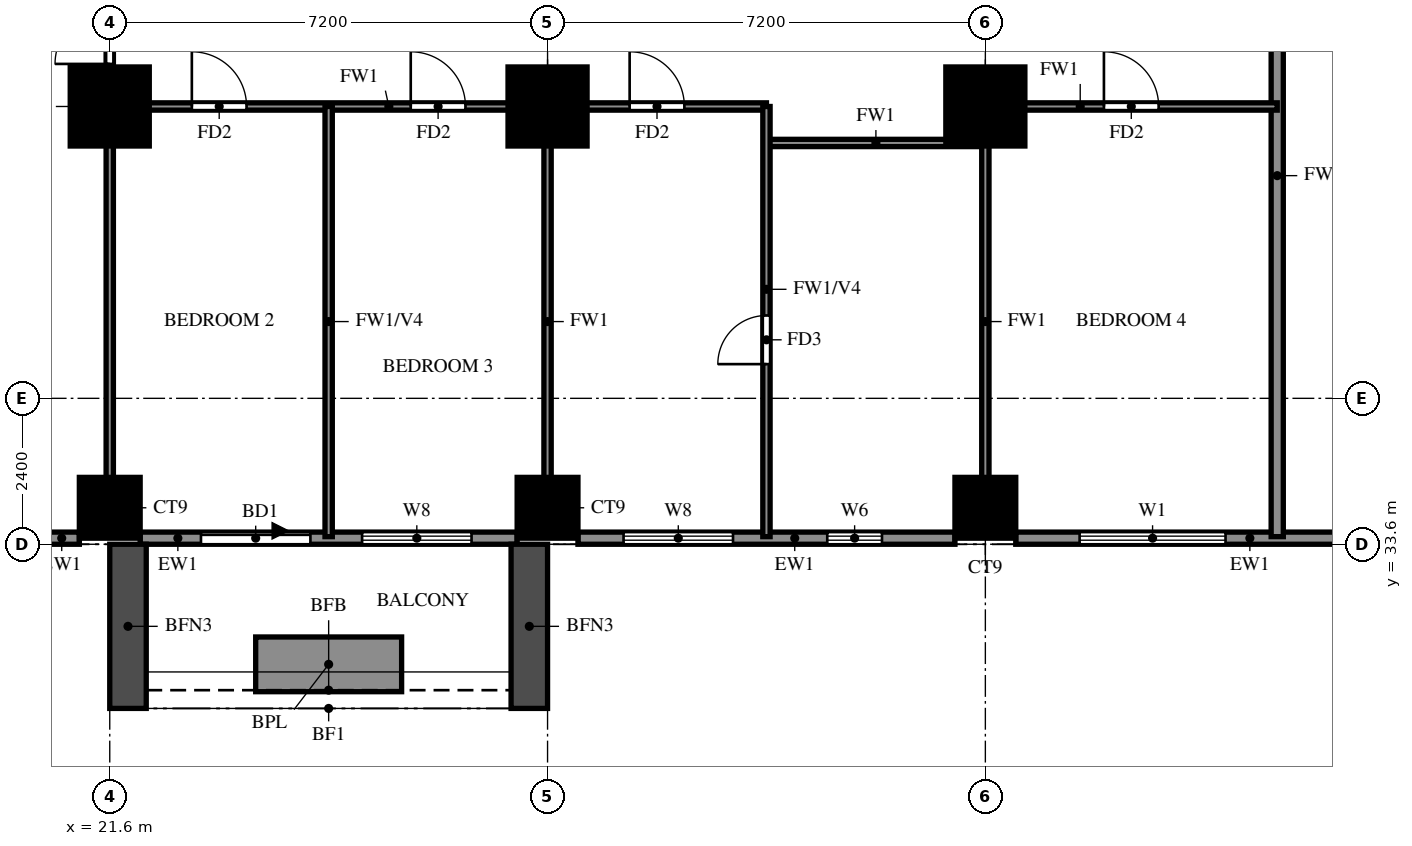
"""IFC4 building model, lengths in metres.
Left out: names, types, materials, properties, quantities, classifications, styles, units other than length and angle.
Written with IfcOpenShell. Run it as: python <this file> out.ifc"""

import sys

from ifc_helpers import new_model, si_unit, direction, frame, frame_2d, origin, origin_2d, place, context, subcontext, project, spatial, rectangle, extrude, source, transform, mapped, element, fill, save


model = new_model("IFC4")
c1 = context("Model", 3, precision=1e-05, world=origin(), true_north=direction((0.0, 1.0)))
c2 = subcontext(c1, "Body", "Model", "MODEL_VIEW")
j1 = project(units=[si_unit("LENGTHUNIT", "METRE"), si_unit("PLANEANGLEUNIT", "RADIAN")], contexts=[c1])
p1 = place(None, origin())
s1 = spatial("IfcSite", under=j1, at=p1, CompositionType="ELEMENT")
p2 = place(p1, origin())
s2 = spatial("IfcBuilding", under=s1, at=p2, CompositionType="ELEMENT")
p3 = place(p2, frame((0.0, 0.0, 65.5)))
s3 = spatial("IfcBuildingStorey", under=s2, at=p3, CompositionType="ELEMENT", Elevation=65.5)
m1 = source(origin(), c2, "Body", "SweptSolid", [
    extrude(rectangle(XDim=1.0, YDim=1.0, at=origin_2d()), origin(), (0.0, 0.0, 1.0), 3.18),
])
for number, where, z_axis, x_axis in (
    (1, (21.6, 34.2, 0.0), (0.0, 0.0, 1.0), (1.0, 0.0, 0.0)),
    (2, (28.8, 34.2, 0.0), (0.0, 0.0, 1.0), (1.0, 0.0, 0.0)),
    (3, (36.0, 34.2, 0.0), (0.0, 0.0, 1.0), (1.0, 0.0, 0.0)),
):
    element("IfcColumn", number, at=place(p3, frame(where, z_axis=z_axis, x_axis=x_axis)), inside=s3, PredefinedType="COLUMN", context=c2, shape_type="MappedRepresentation", body=[
        mapped(m1, transform((0.0, 0.0, 0.0))),
    ])
m2 = source(origin(), c2, "Body", "SweptSolid", [
    extrude(rectangle(XDim=1.3, YDim=1.3, at=origin_2d()), origin(), (0.0, 0.0, 1.0), 3.18),
])
for number, where, z_axis, x_axis in (
    (4, (21.6, 40.8, 0.0), (0.0, 0.0, 1.0), (1.0, 0.0, 0.0)),
    (5, (28.8, 40.8, 0.0), (0.0, 0.0, 1.0), (1.0, 0.0, 0.0)),
    (6, (36.0, 40.8, 0.0), (0.0, 0.0, 1.0), (1.0, 0.0, 0.0)),
):
    element("IfcColumn", number, at=place(p3, frame(where, z_axis=z_axis, x_axis=x_axis)), inside=s3, PredefinedType="COLUMN", context=c2, shape_type="MappedRepresentation", body=[
        mapped(m2, transform((0.0, 0.0, 0.0))),
    ])
p4 = place(p3, frame((18.2, 33.7, 0.0), z_axis=(0.0, 0.0, 1.0), x_axis=(1.0, 0.0, 0.0)))
e7 = element("IfcWall", 7, at=p4, inside=s3, PredefinedType="SOLIDWALL", context=c2, shape_type="SweptSolid", body=[
    extrude(rectangle(XDim=2.9, YDim=0.2, at=frame_2d((1.45, 0.0))), origin(), (0.0, 0.0, 1.0), 3.18),
])
p5 = place(p4, frame((0.55, 0.0, 0.6)))
e8 = element("IfcOpeningElement", 8, at=p5, cuts=e7, PredefinedType="OPENING", context=c2, shape_type="SweptSolid", body=[
    extrude(rectangle(XDim=1.8, YDim=2.4, at=frame_2d((0.9, 1.2))), frame((0.0, 0.11, 0.0), z_axis=(0.0, -1.0, 0.0), x_axis=(1.0, 0.0, 0.0)), (0.0, 0.0, 1.0), 0.22),
])
p6 = place(p3, frame((22.1, 33.7, 0.0), z_axis=(0.0, 0.0, 1.0), x_axis=(1.0, 0.0, 0.0)))
e9 = element("IfcWall", 9, at=p6, inside=s3, PredefinedType="SOLIDWALL", context=c2, shape_type="SweptSolid", body=[
    extrude(rectangle(XDim=6.2, YDim=0.2, at=frame_2d((3.1, 0.0))), origin(), (0.0, 0.0, 1.0), 3.18),
])
p7 = place(p6, frame((1.0, 0.0, 0.0)))
e10 = element("IfcOpeningElement", 10, at=p7, cuts=e9, PredefinedType="OPENING", context=c2, shape_type="SweptSolid", body=[
    extrude(rectangle(XDim=1.8, YDim=2.4, at=frame_2d((0.9, 1.2))), frame((0.0, 0.11, 0.0), z_axis=(0.0, -1.0, 0.0), x_axis=(1.0, 0.0, 0.0)), (0.0, 0.0, 1.0), 0.22),
])
p8 = place(p6, frame((3.65, 0.0, 0.6)))
e11 = element("IfcOpeningElement", 11, at=p8, cuts=e9, PredefinedType="OPENING", context=c2, shape_type="SweptSolid", body=[
    extrude(rectangle(XDim=1.8, YDim=2.4, at=frame_2d((0.9, 1.2))), frame((0.0, 0.11, 0.0), z_axis=(0.0, -1.0, 0.0), x_axis=(1.0, 0.0, 0.0)), (0.0, 0.0, 1.0), 0.22),
])
p9 = place(p3, frame((29.3, 33.7, 0.0), z_axis=(0.0, 0.0, 1.0), x_axis=(1.0, 0.0, 0.0)))
e12 = element("IfcWall", 12, at=p9, inside=s3, PredefinedType="SOLIDWALL", context=c2, shape_type="SweptSolid", body=[
    extrude(rectangle(XDim=6.2, YDim=0.2, at=frame_2d((3.1, 0.0))), origin(), (0.0, 0.0, 1.0), 3.18),
])
p10 = place(p9, frame((0.75, 0.0, 0.6)))
e13 = element("IfcOpeningElement", 13, at=p10, cuts=e12, PredefinedType="OPENING", context=c2, shape_type="SweptSolid", body=[
    extrude(rectangle(XDim=1.8, YDim=2.4, at=frame_2d((0.9, 1.2))), frame((0.0, 0.11, 0.0), z_axis=(0.0, -1.0, 0.0), x_axis=(1.0, 0.0, 0.0)), (0.0, 0.0, 1.0), 0.22),
])
p11 = place(p9, frame((4.1, 0.0, 1.5)))
e14 = element("IfcOpeningElement", 14, at=p11, cuts=e12, PredefinedType="OPENING", context=c2, shape_type="SweptSolid", body=[
    extrude(rectangle(XDim=0.9, YDim=0.9, at=frame_2d((0.45, 0.45))), frame((0.0, 0.11, 0.0), z_axis=(0.0, -1.0, 0.0), x_axis=(1.0, 0.0, 0.0)), (0.0, 0.0, 1.0), 0.22),
])
p12 = place(p3, frame((36.5, 33.7, 0.0), z_axis=(0.0, 0.0, 1.0), x_axis=(1.0, 0.0, 0.0)))
e15 = element("IfcWall", 15, at=p12, inside=s3, PredefinedType="SOLIDWALL", context=c2, shape_type="SweptSolid", body=[
    extrude(rectangle(XDim=5.5, YDim=0.2, at=frame_2d((2.75, 0.0))), origin(), (0.0, 0.0, 1.0), 3.18),
])
p13 = place(p12, frame((1.05, 0.0, 0.6)))
e16 = element("IfcOpeningElement", 16, at=p13, cuts=e15, PredefinedType="OPENING", context=c2, shape_type="SweptSolid", body=[
    extrude(rectangle(XDim=2.4, YDim=2.4, at=frame_2d((1.2, 1.2))), frame((0.0, 0.11, 0.0), z_axis=(0.0, -1.0, 0.0), x_axis=(1.0, 0.0, 0.0)), (0.0, 0.0, 1.0), 0.22),
])
for number, where, z_axis, x_axis in (
    (17, (21.9, 33.6, 0.0), (0.0, 0.0, 1.0), (0.0, -1.0, 0.0)),
    (18, (28.5, 33.6, 0.0), (0.0, 0.0, 1.0), (0.0, -1.0, 0.0)),
):
    element("IfcWall", number, at=place(p3, frame(where, z_axis=z_axis, x_axis=x_axis)), inside=s3, PredefinedType="SOLIDWALL", context=c2, shape_type="SweptSolid", body=[
        extrude(rectangle(XDim=2.7, YDim=0.6, at=frame_2d((1.35, 0.0))), origin(), (0.0, 0.0, 1.0), 2.85),
    ])
p14 = place(p3, frame((24.0, 31.625, 0.0), z_axis=(0.0, 0.0, 1.0), x_axis=(1.0, 0.0, 0.0)))
e19 = element("IfcWall", 19, at=p14, inside=s3, PredefinedType="SOLIDWALL", context=c2, shape_type="SweptSolid", body=[
    extrude(rectangle(XDim=2.4, YDim=0.9, at=frame_2d((1.2, 0.0))), origin(), (0.0, 0.0, 1.0), 0.9),
])
p15 = place(p3, frame((40.8, 33.725, 0.0), z_axis=(0.0, 0.0, 1.0), x_axis=(0.0, 1.0, 0.0)))
e20 = element("IfcWall", 20, at=p15, inside=s3, PredefinedType="SOLIDWALL", context=c2, shape_type="SweptSolid", body=[
    extrude(rectangle(XDim=11.875, YDim=0.2, at=frame_2d((5.938, 0.0))), origin(), (0.0, 0.0, 1.0), 2.28),
])
p16 = place(p15, frame((10.025, 0.0, 0.0)))
e21 = element("IfcOpeningElement", 21, at=p16, cuts=e20, PredefinedType="OPENING", context=c2, shape_type="SweptSolid", body=[
    extrude(rectangle(XDim=1.0, YDim=2.1, at=frame_2d((0.5, 1.05))), frame((0.0, 0.11, 0.0), z_axis=(0.0, -1.0, 0.0), x_axis=(1.0, 0.0, 0.0)), (0.0, 0.0, 1.0), 0.22),
])
p17 = place(p3, frame((32.4, 40.2, 0.0), z_axis=(0.0, 0.0, 1.0), x_axis=(1.0, 0.0, 0.0)))
e22 = element("IfcWall", 22, at=p17, inside=s3, PredefinedType="PARTITIONING", context=c2, shape_type="SweptSolid", body=[
    extrude(rectangle(XDim=3.6, YDim=0.12, at=frame_2d((1.8, 0.0))), origin(), (0.0, 0.0, 1.0), 3.18),
])
p18 = place(p3, frame((21.6, 40.8, 0.0), z_axis=(0.0, 0.0, 1.0), x_axis=(1.0, 0.0, 0.0)))
e23 = element("IfcWall", 23, at=p18, inside=s3, PredefinedType="PARTITIONING", context=c2, shape_type="SweptSolid", body=[
    extrude(rectangle(XDim=10.8, YDim=0.12, at=frame_2d((5.4, 0.0))), origin(), (0.0, 0.0, 1.0), 3.18),
])
p19 = place(p18, frame((1.35, 0.0, 0.0)))
e24 = element("IfcOpeningElement", 24, at=p19, cuts=e23, PredefinedType="OPENING", context=c2, shape_type="SweptSolid", body=[
    extrude(rectangle(XDim=0.9, YDim=2.1, at=frame_2d((0.45, 1.05))), frame((0.0, 0.07, 0.0), z_axis=(0.0, -1.0, 0.0), x_axis=(1.0, 0.0, 0.0)), (0.0, 0.0, 1.0), 0.14),
])
p20 = place(p18, frame((4.95, 0.0, 0.0)))
e25 = element("IfcOpeningElement", 25, at=p20, cuts=e23, PredefinedType="OPENING", context=c2, shape_type="SweptSolid", body=[
    extrude(rectangle(XDim=0.9, YDim=2.1, at=frame_2d((0.45, 1.05))), frame((0.0, 0.07, 0.0), z_axis=(0.0, -1.0, 0.0), x_axis=(1.0, 0.0, 0.0)), (0.0, 0.0, 1.0), 0.14),
])
p21 = place(p18, frame((8.55, 0.0, 0.0)))
e26 = element("IfcOpeningElement", 26, at=p21, cuts=e23, PredefinedType="OPENING", context=c2, shape_type="SweptSolid", body=[
    extrude(rectangle(XDim=0.9, YDim=2.1, at=frame_2d((0.45, 1.05))), frame((0.0, 0.07, 0.0), z_axis=(0.0, -1.0, 0.0), x_axis=(1.0, 0.0, 0.0)), (0.0, 0.0, 1.0), 0.14),
])
p22 = place(p3, frame((36.0, 40.8, 0.0), z_axis=(0.0, 0.0, 1.0), x_axis=(1.0, 0.0, 0.0)))
e27 = element("IfcWall", 27, at=p22, inside=s3, PredefinedType="PARTITIONING", context=c2, shape_type="SweptSolid", body=[
    extrude(rectangle(XDim=4.8, YDim=0.12, at=frame_2d((2.4, 0.0))), origin(), (0.0, 0.0, 1.0), 3.18),
])
p23 = place(p22, frame((1.95, 0.0, 0.0)))
e28 = element("IfcOpeningElement", 28, at=p23, cuts=e27, PredefinedType="OPENING", context=c2, shape_type="SweptSolid", body=[
    extrude(rectangle(XDim=0.9, YDim=2.1, at=frame_2d((0.45, 1.05))), frame((0.0, 0.07, 0.0), z_axis=(0.0, -1.0, 0.0), x_axis=(1.0, 0.0, 0.0)), (0.0, 0.0, 1.0), 0.14),
])
p24 = place(p3, frame((21.6, 33.725, 0.0), z_axis=(0.0, 0.0, 1.0), x_axis=(0.0, 1.0, 0.0)))
e29 = element("IfcWall", 29, at=p24, inside=s3, PredefinedType="PARTITIONING", context=c2, shape_type="SweptSolid", body=[
    extrude(rectangle(XDim=39.475, YDim=0.12, at=frame_2d((19.737, 0.0))), origin(), (0.0, 0.0, 1.0), 3.18),
])
p25 = place(p24, frame((7.775, 0.0, 0.0)))
e30 = element("IfcOpeningElement", 30, at=p25, cuts=e29, PredefinedType="OPENING", context=c2, shape_type="SweptSolid", body=[
    extrude(rectangle(XDim=0.9, YDim=2.1, at=frame_2d((0.45, 1.05))), frame((0.0, 0.07, 0.0), z_axis=(0.0, -1.0, 0.0), x_axis=(1.0, 0.0, 0.0)), (0.0, 0.0, 1.0), 0.14),
])
p26 = place(p24, frame((15.625, 0.0, 0.0)))
e31 = element("IfcOpeningElement", 31, at=p26, cuts=e29, PredefinedType="OPENING", context=c2, shape_type="SweptSolid", body=[
    extrude(rectangle(XDim=0.9, YDim=2.1, at=frame_2d((0.45, 1.05))), frame((0.0, 0.07, 0.0), z_axis=(0.0, -1.0, 0.0), x_axis=(1.0, 0.0, 0.0)), (0.0, 0.0, 1.0), 0.14),
])
p27 = place(p24, frame((19.225, 0.0, 0.0)))
e32 = element("IfcOpeningElement", 32, at=p27, cuts=e29, PredefinedType="OPENING", context=c2, shape_type="SweptSolid", body=[
    extrude(rectangle(XDim=0.9, YDim=2.1, at=frame_2d((0.45, 1.05))), frame((0.0, 0.07, 0.0), z_axis=(0.0, -1.0, 0.0), x_axis=(1.0, 0.0, 0.0)), (0.0, 0.0, 1.0), 0.14),
])
p28 = place(p24, frame((24.325, 0.0, 0.0)))
e33 = element("IfcOpeningElement", 33, at=p28, cuts=e29, PredefinedType="OPENING", context=c2, shape_type="SweptSolid", body=[
    extrude(rectangle(XDim=1.5, YDim=2.1, at=frame_2d((0.75, 1.05))), frame((0.0, 0.07, 0.0), z_axis=(0.0, -1.0, 0.0), x_axis=(1.0, 0.0, 0.0)), (0.0, 0.0, 1.0), 0.14),
])
p29 = place(p24, frame((30.025, 0.0, 0.0)))
e34 = element("IfcOpeningElement", 34, at=p29, cuts=e29, PredefinedType="OPENING", context=c2, shape_type="SweptSolid", body=[
    extrude(rectangle(XDim=0.9, YDim=2.1, at=frame_2d((0.45, 1.05))), frame((0.0, 0.07, 0.0), z_axis=(0.0, -1.0, 0.0), x_axis=(1.0, 0.0, 0.0)), (0.0, 0.0, 1.0), 0.14),
])
p30 = place(p24, frame((33.625, 0.0, 0.0)))
e35 = element("IfcOpeningElement", 35, at=p30, cuts=e29, PredefinedType="OPENING", context=c2, shape_type="SweptSolid", body=[
    extrude(rectangle(XDim=0.9, YDim=2.1, at=frame_2d((0.45, 1.05))), frame((0.0, 0.07, 0.0), z_axis=(0.0, -1.0, 0.0), x_axis=(1.0, 0.0, 0.0)), (0.0, 0.0, 1.0), 0.14),
])
p31 = place(p24, frame((37.225, 0.0, 0.0)))
e36 = element("IfcOpeningElement", 36, at=p31, cuts=e29, PredefinedType="OPENING", context=c2, shape_type="SweptSolid", body=[
    extrude(rectangle(XDim=0.9, YDim=2.1, at=frame_2d((0.45, 1.05))), frame((0.0, 0.07, 0.0), z_axis=(0.0, -1.0, 0.0), x_axis=(1.0, 0.0, 0.0)), (0.0, 0.0, 1.0), 0.14),
])
p32 = place(p3, frame((25.2, 33.725, 0.0), z_axis=(0.0, 0.0, 1.0), x_axis=(0.0, 1.0, 0.0)))
e37 = element("IfcWall", 37, at=p32, inside=s3, PredefinedType="PARTITIONING", context=c2, shape_type="SweptSolid", body=[
    extrude(rectangle(XDim=7.075, YDim=0.12, at=frame_2d((3.538, 0.0))), origin(), (0.0, 0.0, 1.0), 2.28),
])
p33 = place(p3, frame((28.8, 33.725, 0.0), z_axis=(0.0, 0.0, 1.0), x_axis=(0.0, 1.0, 0.0)))
e38 = element("IfcWall", 38, at=p33, inside=s3, PredefinedType="PARTITIONING", context=c2, shape_type="SweptSolid", body=[
    extrude(rectangle(XDim=7.075, YDim=0.12, at=frame_2d((3.538, 0.0))), origin(), (0.0, 0.0, 1.0), 3.18),
])
p34 = place(p3, frame((32.4, 33.725, 0.0), z_axis=(0.0, 0.0, 1.0), x_axis=(0.0, 1.0, 0.0)))
e39 = element("IfcWall", 39, at=p34, inside=s3, PredefinedType="PARTITIONING", context=c2, shape_type="SweptSolid", body=[
    extrude(rectangle(XDim=7.075, YDim=0.12, at=frame_2d((3.538, 0.0))), origin(), (0.0, 0.0, 1.0), 2.28),
])
p35 = place(p34, frame((2.837, 0.0, 0.0)))
e40 = element("IfcOpeningElement", 40, at=p35, cuts=e39, PredefinedType="OPENING", context=c2, shape_type="SweptSolid", body=[
    extrude(rectangle(XDim=0.8, YDim=2.1, at=frame_2d((0.4, 1.05))), frame((0.0, 0.07, 0.0), z_axis=(0.0, -1.0, 0.0), x_axis=(1.0, 0.0, 0.0)), (0.0, 0.0, 1.0), 0.14),
])
p36 = place(p3, frame((36.0, 33.725, 0.0), z_axis=(0.0, 0.0, 1.0), x_axis=(0.0, 1.0, 0.0)))
e41 = element("IfcWall", 41, at=p36, inside=s3, PredefinedType="PARTITIONING", context=c2, shape_type="SweptSolid", body=[
    extrude(rectangle(XDim=7.075, YDim=0.12, at=frame_2d((3.538, 0.0))), origin(), (0.0, 0.0, 1.0), 3.18),
])
p37 = place(p7, origin())
e42 = element("IfcDoor", 42, at=p37, inside=s3, OperationType="DOUBLE_DOOR_SLIDING", PredefinedType="DOOR", context=c2, shape_type="SweptSolid", body=[
    extrude(rectangle(XDim=1.8, YDim=2.4, at=frame_2d((0.9, 1.2))), frame((0.0, 0.025, 0.0), z_axis=(0.0, -1.0, 0.0), x_axis=(1.0, 0.0, 0.0)), (0.0, 0.0, 1.0), 0.05),
])
fill(e10, e42)
p38 = place(p8, origin())
e43 = element("IfcWindow", 43, at=p38, inside=s3, PartitioningType="DOUBLE_PANEL_VERTICAL", PredefinedType="WINDOW", context=c2, shape_type="SweptSolid", body=[
    extrude(rectangle(XDim=1.8, YDim=2.4, at=frame_2d((0.9, 1.2))), frame((0.0, 0.03, 0.0), z_axis=(0.0, -1.0, 0.0), x_axis=(1.0, 0.0, 0.0)), (0.0, 0.0, 1.0), 0.06),
])
fill(e11, e43)
p39 = place(p10, origin())
e44 = element("IfcWindow", 44, at=p39, inside=s3, PartitioningType="DOUBLE_PANEL_VERTICAL", PredefinedType="WINDOW", context=c2, shape_type="SweptSolid", body=[
    extrude(rectangle(XDim=1.8, YDim=2.4, at=frame_2d((0.9, 1.2))), frame((0.0, 0.03, 0.0), z_axis=(0.0, -1.0, 0.0), x_axis=(1.0, 0.0, 0.0)), (0.0, 0.0, 1.0), 0.06),
])
fill(e13, e44)
p40 = place(p11, origin())
e45 = element("IfcWindow", 45, at=p40, inside=s3, PartitioningType="SINGLE_PANEL", PredefinedType="WINDOW", context=c2, shape_type="SweptSolid", body=[
    extrude(rectangle(XDim=0.9, YDim=0.9, at=frame_2d((0.45, 0.45))), frame((0.0, 0.03, 0.0), z_axis=(0.0, -1.0, 0.0), x_axis=(1.0, 0.0, 0.0)), (0.0, 0.0, 1.0), 0.06),
])
fill(e14, e45)
p41 = place(p13, origin())
e46 = element("IfcWindow", 46, at=p41, inside=s3, PartitioningType="DOUBLE_PANEL_VERTICAL", PredefinedType="WINDOW", context=c2, shape_type="SweptSolid", body=[
    extrude(rectangle(XDim=2.4, YDim=2.4, at=frame_2d((1.2, 1.2))), frame((0.0, 0.03, 0.0), z_axis=(0.0, -1.0, 0.0), x_axis=(1.0, 0.0, 0.0)), (0.0, 0.0, 1.0), 0.06),
])
fill(e16, e46)
p42 = place(p25, origin())
e47 = element("IfcDoor", 47, at=p42, inside=s3, OperationType="SINGLE_SWING_RIGHT", PredefinedType="DOOR", context=c2, shape_type="SweptSolid", body=[
    extrude(rectangle(XDim=0.9, YDim=2.1, at=frame_2d((0.45, 1.05))), frame((0.0, 0.025, 0.0), z_axis=(0.0, -1.0, 0.0), x_axis=(1.0, 0.0, 0.0)), (0.0, 0.0, 1.0), 0.05),
])
fill(e30, e47)
p43 = place(p19, origin())
e48 = element("IfcDoor", 48, at=p43, inside=s3, OperationType="SINGLE_SWING_RIGHT", PredefinedType="DOOR", context=c2, shape_type="SweptSolid", body=[
    extrude(rectangle(XDim=0.9, YDim=2.1, at=frame_2d((0.45, 1.05))), frame((0.0, 0.025, 0.0), z_axis=(0.0, -1.0, 0.0), x_axis=(1.0, 0.0, 0.0)), (0.0, 0.0, 1.0), 0.05),
])
fill(e24, e48)
p44 = place(p20, origin())
e49 = element("IfcDoor", 49, at=p44, inside=s3, OperationType="SINGLE_SWING_LEFT", PredefinedType="DOOR", context=c2, shape_type="SweptSolid", body=[
    extrude(rectangle(XDim=0.9, YDim=2.1, at=frame_2d((0.45, 1.05))), frame((0.0, 0.025, 0.0), z_axis=(0.0, -1.0, 0.0), x_axis=(1.0, 0.0, 0.0)), (0.0, 0.0, 1.0), 0.05),
])
fill(e25, e49)
p45 = place(p21, origin())
e50 = element("IfcDoor", 50, at=p45, inside=s3, OperationType="SINGLE_SWING_LEFT", PredefinedType="DOOR", context=c2, shape_type="SweptSolid", body=[
    extrude(rectangle(XDim=0.9, YDim=2.1, at=frame_2d((0.45, 1.05))), frame((0.0, 0.025, 0.0), z_axis=(0.0, -1.0, 0.0), x_axis=(1.0, 0.0, 0.0)), (0.0, 0.0, 1.0), 0.05),
])
fill(e26, e50)
p46 = place(p35, origin())
e51 = element("IfcDoor", 51, at=p46, inside=s3, OperationType="SINGLE_SWING_RIGHT", PredefinedType="DOOR", context=c2, shape_type="SweptSolid", body=[
    extrude(rectangle(XDim=0.8, YDim=2.1, at=frame_2d((0.4, 1.05))), frame((0.0, 0.025, 0.0), z_axis=(0.0, -1.0, 0.0), x_axis=(1.0, 0.0, 0.0)), (0.0, 0.0, 1.0), 0.05),
])
fill(e40, e51)
p47 = place(p23, origin())
e52 = element("IfcDoor", 52, at=p47, inside=s3, OperationType="SINGLE_SWING_LEFT", PredefinedType="DOOR", context=c2, shape_type="SweptSolid", body=[
    extrude(rectangle(XDim=0.9, YDim=2.1, at=frame_2d((0.45, 1.05))), frame((0.0, 0.025, 0.0), z_axis=(0.0, -1.0, 0.0), x_axis=(1.0, 0.0, 0.0)), (0.0, 0.0, 1.0), 0.05),
])
fill(e28, e52)
save(model, sys.argv[1])
